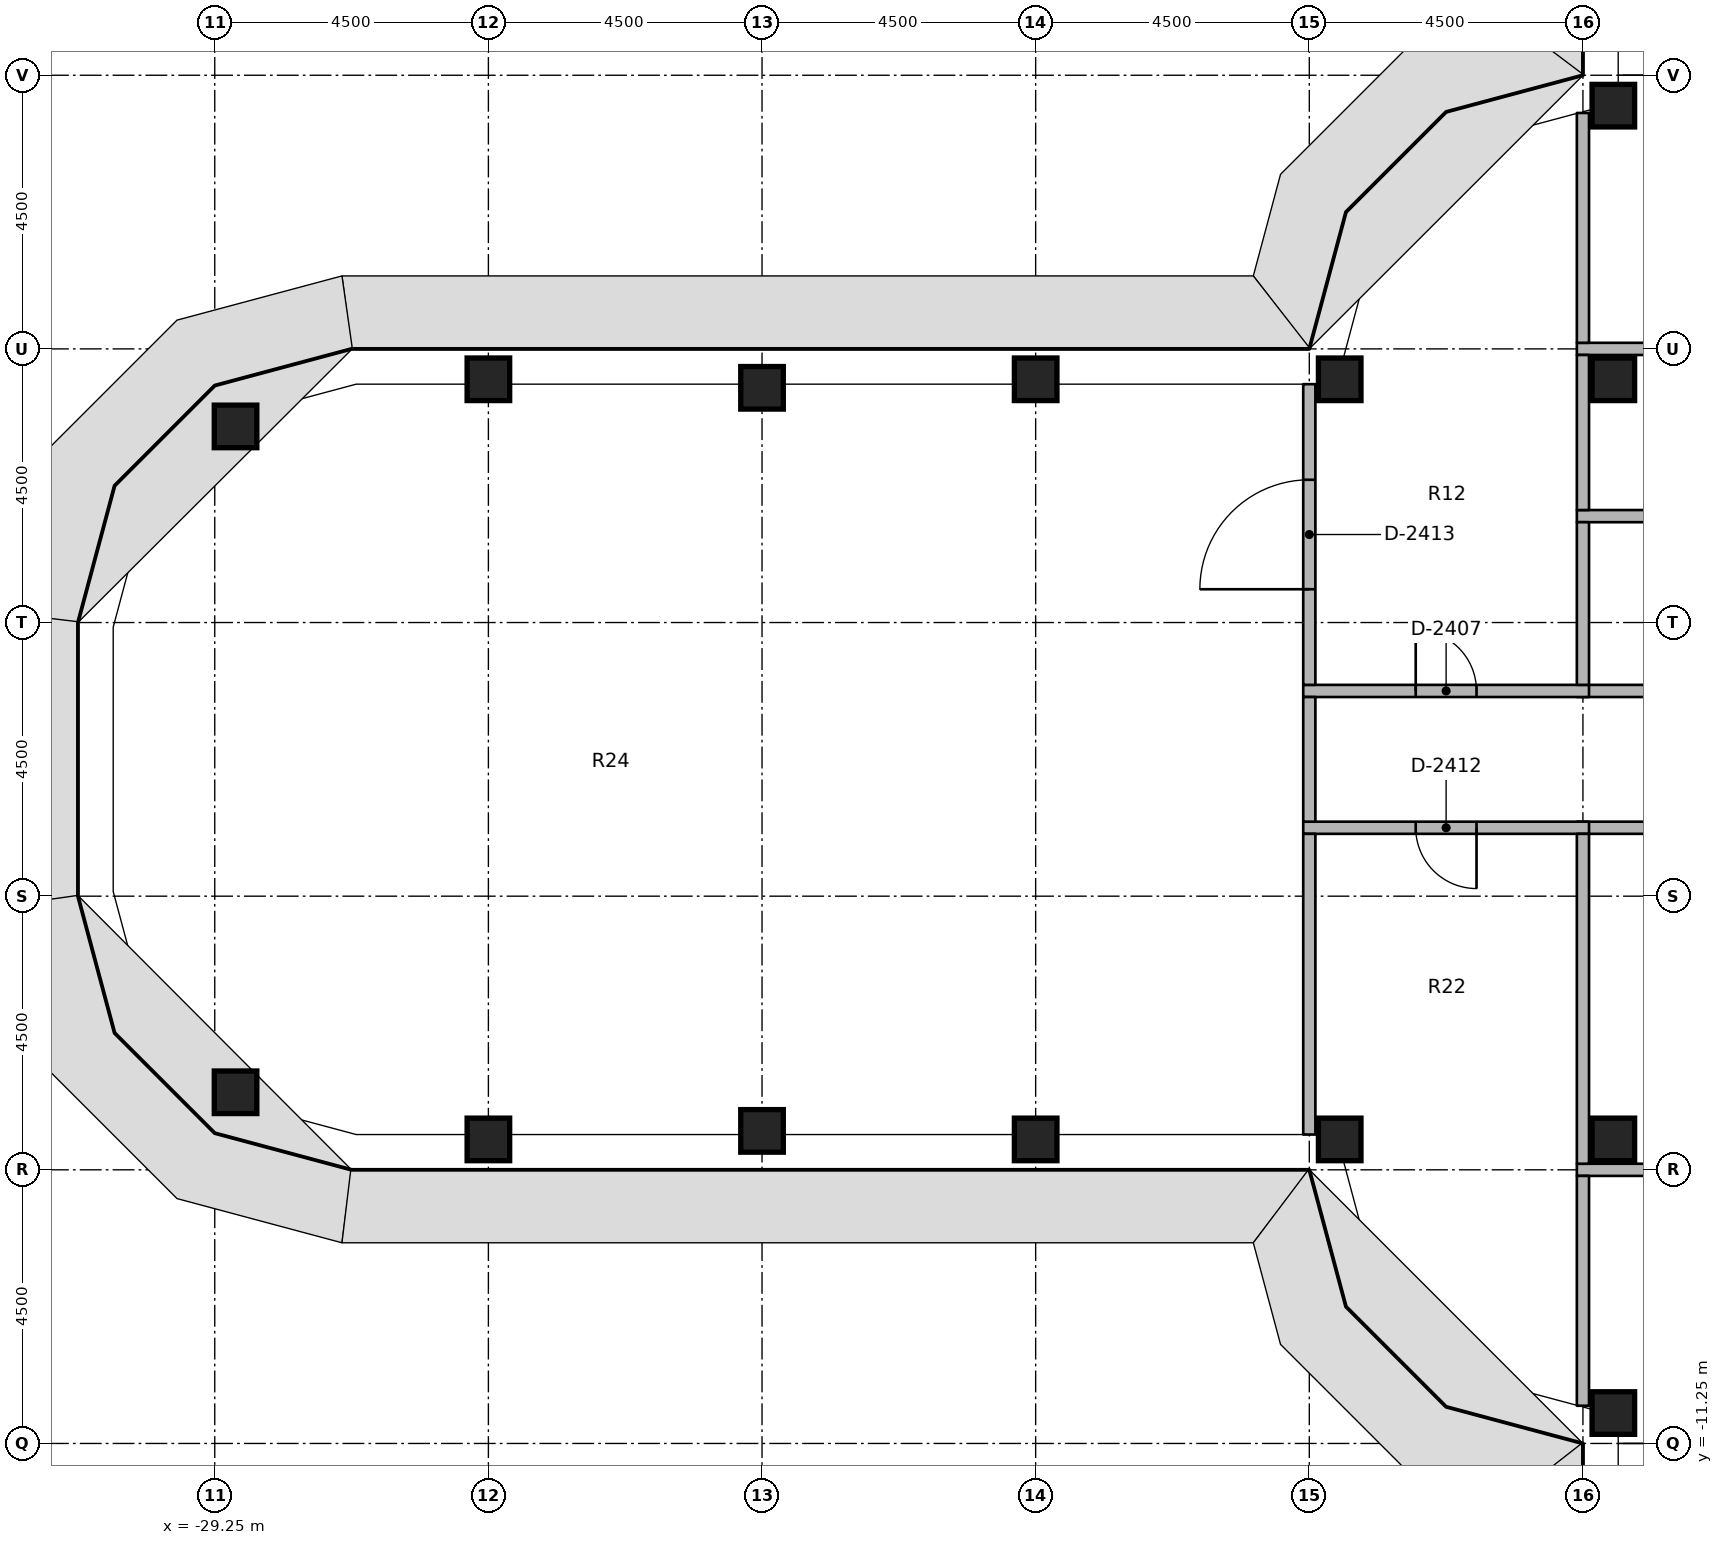
"""IFC4 building model, lengths in metres.
Left out: names, types, materials, properties, quantities, classifications, styles, units other than length and angle.
Written with IfcOpenShell. Run it as: python <this file> out.ifc"""

import sys

from ifc_helpers import new_model, si_unit, direction, frame, frame_2d, origin, origin_2d, place, context, subcontext, project, spatial, rectangle, extrude, element, fill, save


model = new_model("IFC4")
c1 = context("Model", 3, precision=1e-05, world=origin(), true_north=direction((0.0, 1.0)))
c2 = subcontext(c1, "Body", "Model", "MODEL_VIEW")
j1 = project(units=[si_unit("LENGTHUNIT", "METRE"), si_unit("PLANEANGLEUNIT", "RADIAN")], contexts=[c1])
p1 = place(None, origin())
s1 = spatial("IfcSite", under=j1, at=p1, CompositionType="ELEMENT")
p2 = place(p1, origin())
s2 = spatial("IfcBuilding", under=s1, at=p2, CompositionType="ELEMENT")
p3 = place(p2, frame((0.0, 0.0, 222.0)))
s3 = spatial("IfcBuildingStorey", under=s2, at=p3, CompositionType="ELEMENT", Elevation=222.0)
for number, where, z_axis, x_axis in (
    (1, (-28.908, -5.475, 0.0), (0.0, 0.0, 1.0), (1.0, 0.0, 0.0)),
    (2, (-28.908, 5.475, 0.0), (0.0, 0.0, 1.0), (1.0, 0.0, 0.0)),
    (3, (-24.75, -6.25, 0.0), (0.0, 0.0, 1.0), (1.0, 0.0, 0.0)),
    (4, (-24.75, 6.25, 0.0), (0.0, 0.0, 1.0), (1.0, 0.0, 0.0)),
    (5, (-20.25, -6.11, 0.0), (0.0, 0.0, 1.0), (1.0, 0.0, 0.0)),
    (6, (-20.25, 6.11, 0.0), (0.0, 0.0, 1.0), (1.0, 0.0, 0.0)),
    (7, (-15.75, -6.25, 0.0), (0.0, 0.0, 1.0), (1.0, 0.0, 0.0)),
    (8, (-15.75, 6.25, 0.0), (0.0, 0.0, 1.0), (1.0, 0.0, 0.0)),
    (9, (-10.75, -6.25, 0.0), (0.0, 0.0, 1.0), (1.0, 0.0, 0.0)),
    (10, (-10.75, 6.25, 0.0), (0.0, 0.0, 1.0), (1.0, 0.0, 0.0)),
    (11, (-6.25, -10.75, 0.0), (0.0, 0.0, 1.0), (1.0, 0.0, 0.0)),
    (12, (-6.25, -6.25, 0.0), (0.0, 0.0, 1.0), (1.0, 0.0, 0.0)),
    (13, (-6.25, 6.25, 0.0), (0.0, 0.0, 1.0), (1.0, 0.0, 0.0)),
    (14, (-6.25, 10.75, 0.0), (0.0, 0.0, 1.0), (1.0, 0.0, 0.0)),
):
    element("IfcColumn", number, at=place(p3, frame(where, z_axis=z_axis, x_axis=x_axis)), inside=s3, PredefinedType="COLUMN", context=c2, shape_type="SweptSolid", body=[
        extrude(rectangle(XDim=0.7, YDim=0.7, at=origin_2d()), origin(), (0.0, 0.0, 1.0), 3.65),
    ])
p4 = place(p3, frame((-6.85, 1.125, 0.0), z_axis=(0.0, 0.0, 1.0), x_axis=(1.0, 0.0, 0.0)))
e15 = element("IfcWall", 15, at=p4, inside=s3, PredefinedType="PARTITIONING", context=c2, shape_type="SweptSolid", body=[
    extrude(rectangle(XDim=5.825, YDim=0.2, at=frame_2d((2.913, 0.0))), origin(), (0.0, 0.0, 1.0), 2.75),
])
p5 = place(p4, frame((2.462, 0.0, 0.0)))
e16 = element("IfcOpeningElement", 16, at=p5, cuts=e15, PredefinedType="OPENING", context=c2, shape_type="SweptSolid", body=[
    extrude(rectangle(XDim=0.9, YDim=2.1, at=frame_2d((0.45, 1.05))), frame((0.0, 0.11, 0.0), z_axis=(0.0, -1.0, 0.0), x_axis=(1.0, 0.0, 0.0)), (0.0, 0.0, 1.0), 0.22),
])
p6 = place(p3, frame((-11.35, 1.125, 0.0), z_axis=(0.0, 0.0, 1.0), x_axis=(1.0, 0.0, 0.0)))
e17 = element("IfcWall", 17, at=p6, inside=s3, PredefinedType="PARTITIONING", context=c2, shape_type="SweptSolid", body=[
    extrude(rectangle(XDim=4.7, YDim=0.2, at=frame_2d((2.35, 0.0))), origin(), (0.0, 0.0, 1.0), 2.75),
])
p7 = place(p6, frame((1.85, 0.0, 0.0)))
e18 = element("IfcOpeningElement", 18, at=p7, cuts=e17, PredefinedType="OPENING", context=c2, shape_type="SweptSolid", body=[
    extrude(rectangle(XDim=1.0, YDim=2.1, at=frame_2d((0.5, 1.05))), frame((0.0, 0.11, 0.0), z_axis=(0.0, -1.0, 0.0), x_axis=(1.0, 0.0, 0.0)), (0.0, 0.0, 1.0), 0.22),
])
p8 = place(p3, frame((-1.025, -1.125, 0.0), z_axis=(0.0, 0.0, 1.0), x_axis=(-1.0, 0.0, 0.0)))
e19 = element("IfcWall", 19, at=p8, inside=s3, PredefinedType="PARTITIONING", context=c2, shape_type="SweptSolid", body=[
    extrude(rectangle(XDim=5.825, YDim=0.2, at=frame_2d((2.913, 0.0))), origin(), (0.0, 0.0, 1.0), 2.75),
])
p9 = place(p8, frame((2.413, 0.0, 0.0)))
e20 = element("IfcOpeningElement", 20, at=p9, cuts=e19, PredefinedType="OPENING", context=c2, shape_type="SweptSolid", body=[
    extrude(rectangle(XDim=1.0, YDim=2.1, at=frame_2d((0.5, 1.05))), frame((0.0, 0.11, 0.0), z_axis=(0.0, -1.0, 0.0), x_axis=(1.0, 0.0, 0.0)), (0.0, 0.0, 1.0), 0.22),
])
p10 = place(p3, frame((-6.65, -1.125, 0.0), z_axis=(0.0, 0.0, 1.0), x_axis=(-1.0, 0.0, 0.0)))
e21 = element("IfcWall", 21, at=p10, inside=s3, PredefinedType="PARTITIONING", context=c2, shape_type="SweptSolid", body=[
    extrude(rectangle(XDim=4.7, YDim=0.2, at=frame_2d((2.35, 0.0))), origin(), (0.0, 0.0, 1.0), 2.75),
])
p11 = place(p10, frame((1.85, 0.0, 0.0)))
e22 = element("IfcOpeningElement", 22, at=p11, cuts=e21, PredefinedType="OPENING", context=c2, shape_type="SweptSolid", body=[
    extrude(rectangle(XDim=1.0, YDim=2.1, at=frame_2d((0.5, 1.05))), frame((0.0, 0.11, 0.0), z_axis=(0.0, -1.0, 0.0), x_axis=(1.0, 0.0, 0.0)), (0.0, 0.0, 1.0), 0.22),
])
p12 = place(p3, frame((-11.25, -1.025, 0.0), z_axis=(0.0, 0.0, 1.0), x_axis=(0.0, 1.0, 0.0)))
e23 = element("IfcWall", 23, at=p12, inside=s3, PredefinedType="PARTITIONING", context=c2, shape_type="SweptSolid", body=[
    extrude(rectangle(XDim=2.05, YDim=0.2, at=frame_2d((1.025, 0.0))), origin(), (0.0, 0.0, 1.0), 2.75),
])
p13 = place(p3, frame((-6.85, 6.75, 0.0), z_axis=(0.0, 0.0, 1.0), x_axis=(1.0, 0.0, 0.0)))
e24 = element("IfcWall", 24, at=p13, inside=s3, PredefinedType="PARTITIONING", context=c2, shape_type="SweptSolid", body=[
    extrude(rectangle(XDim=5.825, YDim=0.2, at=frame_2d((2.913, 0.0))), origin(), (0.0, 0.0, 1.0), 2.75),
])
p14 = place(p3, frame((-6.75, 6.85, 0.0), z_axis=(0.0, 0.0, 1.0), x_axis=(0.0, 1.0, 0.0)))
e25 = element("IfcWall", 25, at=p14, inside=s3, PredefinedType="PARTITIONING", context=c2, shape_type="SweptSolid", body=[
    extrude(rectangle(XDim=3.78, YDim=0.2, at=frame_2d((1.89, 0.0))), origin(), (0.0, 0.0, 1.0), 2.75),
])
p15 = place(p3, frame((-6.85, -6.75, 0.0), z_axis=(0.0, 0.0, 1.0), x_axis=(1.0, 0.0, 0.0)))
e26 = element("IfcWall", 26, at=p15, inside=s3, PredefinedType="PARTITIONING", context=c2, shape_type="SweptSolid", body=[
    extrude(rectangle(XDim=5.825, YDim=0.2, at=frame_2d((2.913, 0.0))), origin(), (0.0, 0.0, 1.0), 2.75),
])
p16 = place(p3, frame((-6.75, -10.63, 0.0), z_axis=(0.0, 0.0, 1.0), x_axis=(0.0, 1.0, 0.0)))
e27 = element("IfcWall", 27, at=p16, inside=s3, PredefinedType="PARTITIONING", context=c2, shape_type="SweptSolid", body=[
    extrude(rectangle(XDim=3.78, YDim=0.2, at=frame_2d((1.89, 0.0))), origin(), (0.0, 0.0, 1.0), 2.75),
])
p17 = place(p3, frame((-6.85, 4.0, 0.0), z_axis=(0.0, 0.0, 1.0), x_axis=(1.0, 0.0, 0.0)))
e28 = element("IfcWall", 28, at=p17, inside=s3, PredefinedType="PARTITIONING", context=c2, shape_type="SweptSolid", body=[
    extrude(rectangle(XDim=5.825, YDim=0.2, at=frame_2d((2.913, 0.0))), origin(), (0.0, 0.0, 1.0), 2.75),
])
p18 = place(p3, frame((-6.75, 1.225, 0.0), z_axis=(0.0, 0.0, 1.0), x_axis=(0.0, 1.0, 0.0)))
e29 = element("IfcWall", 29, at=p18, inside=s3, PredefinedType="PARTITIONING", context=c2, shape_type="SweptSolid", body=[
    extrude(rectangle(XDim=2.675, YDim=0.2, at=frame_2d((1.337, 0.0))), origin(), (0.0, 0.0, 1.0), 2.75),
])
p19 = place(p3, frame((-6.75, 4.1, 0.0), z_axis=(0.0, 0.0, 1.0), x_axis=(0.0, 1.0, 0.0)))
e30 = element("IfcWall", 30, at=p19, inside=s3, PredefinedType="PARTITIONING", context=c2, shape_type="SweptSolid", body=[
    extrude(rectangle(XDim=2.55, YDim=0.2, at=frame_2d((1.275, 0.0))), origin(), (0.0, 0.0, 1.0), 2.75),
])
p20 = place(p3, frame((-11.25, 1.225, 0.0), z_axis=(0.0, 0.0, 1.0), x_axis=(0.0, 1.0, 0.0)))
e31 = element("IfcWall", 31, at=p20, inside=s3, PredefinedType="PARTITIONING", context=c2, shape_type="SweptSolid", body=[
    extrude(rectangle(XDim=4.945, YDim=0.2, at=frame_2d((2.472, 0.0))), origin(), (0.0, 0.0, 1.0), 2.75),
])
p21 = place(p20, frame((1.573, 0.0, 0.0)))
e32 = element("IfcOpeningElement", 32, at=p21, cuts=e31, PredefinedType="OPENING", context=c2, shape_type="SweptSolid", body=[
    extrude(rectangle(XDim=1.8, YDim=2.1, at=frame_2d((0.9, 1.05))), frame((0.0, 0.11, 0.0), z_axis=(0.0, -1.0, 0.0), x_axis=(1.0, 0.0, 0.0)), (0.0, 0.0, 1.0), 0.22),
])
p22 = place(p3, frame((-6.75, -6.65, 0.0), z_axis=(0.0, 0.0, 1.0), x_axis=(0.0, 1.0, 0.0)))
e33 = element("IfcWall", 33, at=p22, inside=s3, PredefinedType="PARTITIONING", context=c2, shape_type="SweptSolid", body=[
    extrude(rectangle(XDim=5.425, YDim=0.2, at=frame_2d((2.712, 0.0))), origin(), (0.0, 0.0, 1.0), 2.75),
])
p23 = place(p3, frame((-11.25, -6.17, 0.0), z_axis=(0.0, 0.0, 1.0), x_axis=(0.0, 1.0, 0.0)))
e34 = element("IfcWall", 34, at=p23, inside=s3, PredefinedType="PARTITIONING", context=c2, shape_type="SweptSolid", body=[
    extrude(rectangle(XDim=4.945, YDim=0.2, at=frame_2d((2.472, 0.0))), origin(), (0.0, 0.0, 1.0), 2.75),
])
p24 = place(p7, origin())
e35 = element("IfcDoor", 35, at=p24, inside=s3, OperationType="SINGLE_SWING_RIGHT", PredefinedType="DOOR", context=c2, shape_type="SweptSolid", body=[
    extrude(rectangle(XDim=1.0, YDim=2.1, at=frame_2d((0.5, 1.05))), frame((0.0, 0.025, 0.0), z_axis=(0.0, -1.0, 0.0), x_axis=(1.0, 0.0, 0.0)), (0.0, 0.0, 1.0), 0.05),
])
fill(e18, e35)
p25 = place(p11, origin())
e36 = element("IfcDoor", 36, at=p25, inside=s3, OperationType="SINGLE_SWING_RIGHT", PredefinedType="DOOR", context=c2, shape_type="SweptSolid", body=[
    extrude(rectangle(XDim=1.0, YDim=2.1, at=frame_2d((0.5, 1.05))), frame((0.0, 0.025, 0.0), z_axis=(0.0, -1.0, 0.0), x_axis=(1.0, 0.0, 0.0)), (0.0, 0.0, 1.0), 0.05),
])
fill(e22, e36)
p26 = place(p21, origin())
e37 = element("IfcDoor", 37, at=p26, inside=s3, OperationType="DOUBLE_DOOR_SINGLE_SWING", PredefinedType="DOOR", context=c2, shape_type="SweptSolid", body=[
    extrude(rectangle(XDim=1.8, YDim=2.1, at=frame_2d((0.9, 1.05))), frame((0.0, 0.025, 0.0), z_axis=(0.0, -1.0, 0.0), x_axis=(1.0, 0.0, 0.0)), (0.0, 0.0, 1.0), 0.05),
])
fill(e32, e37)
save(model, sys.argv[1])
